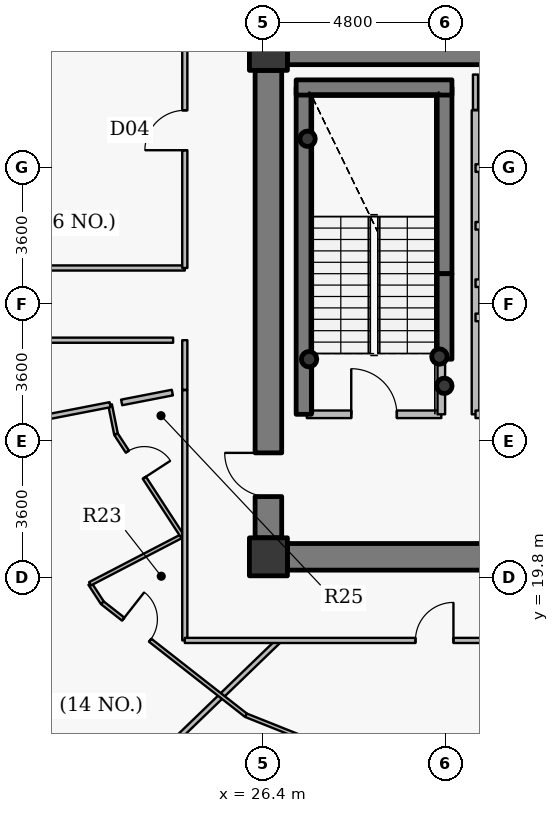
"""IFC4 building model, lengths in metres.
Left out: names, types, materials, properties, quantities, classifications, styles, units other than length and angle.
Written with IfcOpenShell. Run it as: python <this file> out.ifc"""

import sys

from ifc_helpers import new_model, si_unit, direction, frame, frame_2d, origin, origin_2d, place, context, subcontext, project, spatial, rectangle, hollow_circle, extrude, source, transform, mapped, element, fill, save


model = new_model("IFC4")
c1 = context("Model", 3, precision=1e-05, world=origin(), true_north=direction((0.0, 1.0)))
c2 = subcontext(c1, "Body", "Model", "MODEL_VIEW")
j1 = project(units=[si_unit("LENGTHUNIT", "METRE"), si_unit("PLANEANGLEUNIT", "RADIAN")], contexts=[c1])
p1 = place(None, origin())
s1 = spatial("IfcSite", under=j1, at=p1, CompositionType="ELEMENT")
p2 = place(p1, origin())
s2 = spatial("IfcBuilding", under=s1, at=p2, CompositionType="ELEMENT")
p3 = place(p2, frame((0.0, 0.0, 259.05)))
s3 = spatial("IfcBuildingStorey", under=s2, at=p3, CompositionType="ELEMENT", Elevation=259.05)
for number, where, z_axis, x_axis in (
    (1, (26.55, 20.35, 0.0), (0.0, 0.0, 1.0), (1.0, 0.0, 0.0)),
    (2, (26.55, 33.65, 0.0), (0.0, 0.0, 1.0), (1.0, 0.0, 0.0)),
):
    element("IfcColumn", number, at=place(p3, frame(where, z_axis=z_axis, x_axis=x_axis)), inside=s3, PredefinedType="COLUMN", context=c2, shape_type="SweptSolid", body=[
        extrude(rectangle(XDim=1.0, YDim=1.0, at=origin_2d()), origin(), (0.0, 0.0, 1.0), 3.75),
    ])
p4 = place(p3, frame((27.48, 24.1, 0.0), z_axis=(0.0, 0.0, 1.0), x_axis=(0.0, 1.0, 0.0)))
e3 = element("IfcWall", 3, at=p4, inside=s3, PredefinedType="SHEAR", context=c2, shape_type="SweptSolid", body=[
    extrude(rectangle(XDim=8.6, YDim=0.4, at=frame_2d((4.3, 0.0))), origin(), (0.0, 0.0, 1.0), 3.75),
])
p5 = place(p3, frame((31.18, 27.8, 0.0), z_axis=(0.0, 0.0, 1.0), x_axis=(0.0, 1.0, 0.0)))
e4 = element("IfcWall", 4, at=p5, inside=s3, PredefinedType="SHEAR", context=c2, shape_type="SweptSolid", body=[
    extrude(rectangle(XDim=4.9, YDim=0.4, at=frame_2d((2.45, 0.0))), origin(), (0.0, 0.0, 1.0), 3.75),
])
p6 = place(p3, frame((27.28, 32.7, 0.0), z_axis=(0.0, 0.0, 1.0), x_axis=(1.0, 0.0, 0.0)))
e5 = element("IfcWall", 5, at=p6, inside=s3, PredefinedType="SHEAR", context=c2, shape_type="SweptSolid", body=[
    extrude(rectangle(XDim=4.1, YDim=0.4, at=frame_2d((2.05, 0.0))), origin(), (0.0, 0.0, 1.0), 3.75),
])
for number, where, z_axis, x_axis in (
    (6, (27.58, 31.35, 0.0), (0.0, 0.0, 1.0), (1.0, 0.0, 0.0)),
    (7, (31.05, 25.62, 0.0), (0.0, 0.0, 1.0), (1.0, 0.0, 0.0)),
    (8, (31.18, 24.85, 0.0), (0.0, 0.0, 1.0), (1.0, 0.0, 0.0)),
    (9, (27.62, 25.55, 0.0), (0.0, 0.0, 1.0), (1.0, 0.0, 0.0)),
):
    element("IfcColumn", number, at=place(p3, frame(where, z_axis=z_axis, x_axis=x_axis)), inside=s3, PredefinedType="COLUMN", context=c2, shape_type="SweptSolid", body=[
        extrude(hollow_circle(Radius=0.203, WallThickness=0.016, at=origin_2d()), origin(), (0.0, 0.0, 1.0), 3.75),
    ])
p7 = place(p3, frame((27.05, 33.65, 0.0), z_axis=(0.0, 0.0, 1.0), x_axis=(1.0, 0.0, 0.0)))
e10 = element("IfcWall", 10, at=p7, inside=s3, PredefinedType="SHEAR", context=c2, shape_type="SweptSolid", body=[
    extrude(rectangle(XDim=17.9, YDim=0.7, at=frame_2d((8.95, 0.0))), origin(), (0.0, 0.0, 1.0), 3.0),
])
p8 = place(p7, frame((13.675, 0.0, 0.0)))
e11 = element("IfcOpeningElement", 11, at=p8, cuts=e10, PredefinedType="OPENING", context=c2, shape_type="SweptSolid", body=[
    extrude(rectangle(XDim=1.15, YDim=2.15, at=origin_2d()), frame((0.575, 0.36, 1.075), z_axis=(0.0, -1.0, 0.0), x_axis=(1.0, 0.0, 0.0)), (0.0, 0.0, 1.0), 0.72),
])
p9 = place(p3, frame((44.95, 20.35, 0.0), z_axis=(0.0, 0.0, 1.0), x_axis=(-1.0, 0.0, 0.0)))
e12 = element("IfcWall", 12, at=p9, inside=s3, PredefinedType="SHEAR", context=c2, shape_type="SweptSolid", body=[
    extrude(rectangle(XDim=17.9, YDim=0.7, at=frame_2d((8.95, 0.0))), origin(), (0.0, 0.0, 1.0), 3.0),
])
p10 = place(p9, frame((9.7, 0.0, 0.0)))
e13 = element("IfcOpeningElement", 13, at=p10, cuts=e12, PredefinedType="OPENING", context=c2, shape_type="SweptSolid", body=[
    extrude(rectangle(XDim=1.15, YDim=2.15, at=origin_2d()), frame((0.575, 0.36, 1.075), z_axis=(0.0, -1.0, 0.0), x_axis=(1.0, 0.0, 0.0)), (0.0, 0.0, 1.0), 0.72),
])
p11 = place(p3, frame((26.55, 20.85, 0.0), z_axis=(0.0, 0.0, 1.0), x_axis=(0.0, 1.0, 0.0)))
e14 = element("IfcWall", 14, at=p11, inside=s3, PredefinedType="SHEAR", context=c2, shape_type="SweptSolid", body=[
    extrude(rectangle(XDim=12.3, YDim=0.7, at=frame_2d((6.15, 0.0))), origin(), (0.0, 0.0, 1.0), 3.0),
])
p12 = place(p11, frame((1.085, 0.0, 0.0)))
e15 = element("IfcOpeningElement", 15, at=p12, cuts=e14, PredefinedType="OPENING", context=c2, shape_type="SweptSolid", body=[
    extrude(rectangle(XDim=1.15, YDim=2.15, at=origin_2d()), frame((0.575, 0.36, 1.075), z_axis=(0.0, -1.0, 0.0), x_axis=(1.0, 0.0, 0.0)), (0.0, 0.0, 1.0), 0.72),
])
p13 = place(p3, frame((31.18, 25.55, 0.0), z_axis=(0.0, 0.0, 1.0), x_axis=(0.0, 1.0, 0.0)))
e16 = element("IfcWall", 16, at=p13, inside=s3, PredefinedType="SHEAR", context=c2, shape_type="SweptSolid", body=[
    extrude(rectangle(XDim=2.25, YDim=0.4, at=frame_2d((1.125, 0.0))), origin(), (0.0, 0.0, 1.0), 3.05),
])
p14 = place(p3, frame((17.6, 27.95, 0.0), z_axis=(0.0, 0.0, 1.0), x_axis=(1.0, 0.0, 0.0)))
e17 = element("IfcWall", 17, at=p14, inside=s3, PredefinedType="PARTITIONING", context=c2, shape_type="SweptSolid", body=[
    extrude(rectangle(XDim=6.75, YDim=0.135, at=frame_2d((3.375, 0.0))), origin(), (0.0, 0.0, 1.0), 3.45),
])
p15 = place(p3, frame((20.756, 12.291, 0.0), z_axis=(0.0, 0.0, 1.0), x_axis=(0.719623273788, 0.694364705196, 0.0)))
e18 = element("IfcWall", 18, at=p15, inside=s3, PredefinedType="PARTITIONING", context=c2, shape_type="SweptSolid", body=[
    extrude(rectangle(XDim=8.438, YDim=0.135, at=frame_2d((4.219, 0.0))), origin(), (0.0, 0.0, 1.0), 2.935),
])
p16 = place(p3, frame((21.856, 19.641, 0.0), z_axis=(0.0, 0.0, 1.0), x_axis=(0.545246536912, -0.838275738636, 0.0)))
e19 = element("IfcWall", 19, at=p16, inside=s3, PredefinedType="PARTITIONING", context=c2, shape_type="SweptSolid", body=[
    extrude(rectangle(XDim=0.598, YDim=0.1, at=frame_2d((0.299, 0.0))), origin(), (0.0, 0.0, 1.0), 3.45),
])
p17 = place(p3, frame((21.856, 19.641, 0.0), z_axis=(0.0, 0.0, 1.0), x_axis=(0.887130502634, 0.461518657582, 0.0)))
e20 = element("IfcWall", 20, at=p17, inside=s3, PredefinedType="PARTITIONING", context=c2, shape_type="SweptSolid", body=[
    extrude(rectangle(XDim=2.733, YDim=0.1, at=frame_2d((1.367, 0.0))), origin(), (0.0, 0.0, 1.0), 3.45),
])
p18 = place(p3, frame((22.182, 19.139, 0.0), z_axis=(0.0, 0.0, 1.0), x_axis=(0.787386902975, -0.616459134917, 0.0)))
e21 = element("IfcWall", 21, at=p18, inside=s3, PredefinedType="PARTITIONING", context=c2, shape_type="SweptSolid", body=[
    extrude(rectangle(XDim=4.799, YDim=0.1, at=frame_2d((2.399, 0.0))), origin(), (0.0, 0.0, 1.0), 2.885),
])
p19 = place(p18, frame((0.695, 0.0, 0.0)))
e22 = element("IfcOpeningElement", 22, at=p19, cuts=e21, PredefinedType="OPENING", context=c2, shape_type="SweptSolid", body=[
    extrude(rectangle(XDim=0.9, YDim=2.1, at=origin_2d()), frame((0.45, 0.06, 1.05), z_axis=(0.0, -1.0, 0.0), x_axis=(1.0, 0.0, 0.0)), (0.0, 0.0, 1.0), 0.12),
])
p20 = place(p3, frame((22.383, 24.353, 0.0), z_axis=(0.0, 0.0, 1.0), x_axis=(0.198542560358, -0.980092266946, 0.0)))
e23 = element("IfcWall", 23, at=p20, inside=s3, PredefinedType="PARTITIONING", context=c2, shape_type="SweptSolid", body=[
    extrude(rectangle(XDim=0.793, YDim=0.1, at=frame_2d((0.396, 0.0))), origin(), (0.0, 0.0, 1.0), 2.885),
])
p21 = place(p3, frame((22.541, 23.576, 0.0), z_axis=(0.0, 0.0, 1.0), x_axis=(0.545375666154, -0.838191733893, 0.0)))
e24 = element("IfcWall", 24, at=p21, inside=s3, PredefinedType="PARTITIONING", context=c2, shape_type="SweptSolid", body=[
    extrude(rectangle(XDim=3.19, YDim=0.1, at=frame_2d((1.595, 0.0))), origin(), (0.0, 0.0, 1.0), 2.885),
])
p22 = place(p21, frame((0.546, 0.0, 0.0)))
e25 = element("IfcOpeningElement", 25, at=p22, cuts=e24, PredefinedType="OPENING", context=c2, shape_type="SweptSolid", body=[
    extrude(rectangle(XDim=0.82, YDim=2.1, at=origin_2d()), frame((0.41, 0.06, 1.05), z_axis=(0.0, -1.0, 0.0), x_axis=(1.0, 0.0, 0.0)), (0.0, 0.0, 1.0), 0.12),
])
p23 = place(p3, frame((24.35, 18.15, 0.0), z_axis=(0.0, 0.0, 1.0), x_axis=(0.0, 1.0, 0.0)))
e26 = element("IfcWall", 26, at=p23, inside=s3, PredefinedType="PARTITIONING", context=c2, shape_type="SweptSolid", body=[
    extrude(rectangle(XDim=6.585, YDim=0.135, at=frame_2d((3.293, 0.0))), origin(), (0.0, 0.0, 1.0), 2.885),
])
p24 = place(p3, frame((24.35, 18.15, 0.0), z_axis=(0.0, 0.0, 1.0), x_axis=(1.0, 0.0, 0.0)))
e27 = element("IfcWall", 27, at=p24, inside=s3, PredefinedType="PARTITIONING", context=c2, shape_type="SweptSolid", body=[
    extrude(rectangle(XDim=23.85, YDim=0.135, at=frame_2d((11.925, 0.0))), origin(), (0.0, 0.0, 1.0), 2.885),
])
p25 = place(p24, frame((6.069, 0.0, 0.0)))
e28 = element("IfcOpeningElement", 28, at=p25, cuts=e27, PredefinedType="OPENING", context=c2, shape_type="SweptSolid", body=[
    extrude(rectangle(XDim=1.0, YDim=2.15, at=origin_2d()), frame((0.5, 0.078, 1.075), z_axis=(0.0, -1.0, 0.0), x_axis=(1.0, 0.0, 0.0)), (0.0, 0.0, 1.0), 0.155),
])
p26 = place(p24, frame((19.505, 0.0, 0.0)))
e29 = element("IfcOpeningElement", 29, at=p26, cuts=e27, PredefinedType="OPENING", context=c2, shape_type="SweptSolid", body=[
    extrude(rectangle(XDim=1.0, YDim=2.15, at=origin_2d()), frame((0.5, 0.078, 1.075), z_axis=(0.0, -1.0, 0.0), x_axis=(1.0, 0.0, 0.0)), (0.0, 0.0, 1.0), 0.155),
])
p27 = place(p3, frame((24.35, 27.95, 0.0), z_axis=(0.0, 0.0, 1.0), x_axis=(0.0, 1.0, 0.0)))
e30 = element("IfcWall", 30, at=p27, inside=s3, PredefinedType="PARTITIONING", context=c2, shape_type="SweptSolid", body=[
    extrude(rectangle(XDim=7.9, YDim=0.135, at=frame_2d((3.95, 0.0))), origin(), (0.0, 0.0, 1.0), 2.885),
])
p28 = place(p27, frame((3.099, 0.0, 0.0)))
e31 = element("IfcOpeningElement", 31, at=p28, cuts=e30, PredefinedType="OPENING", context=c2, shape_type="SweptSolid", body=[
    extrude(rectangle(XDim=1.05, YDim=2.15, at=origin_2d()), frame((0.525, 0.078, 1.075), z_axis=(0.0, -1.0, 0.0), x_axis=(1.0, 0.0, 0.0)), (0.0, 0.0, 1.0), 0.155),
])
p29 = place(p3, frame((25.961, 16.181, 0.0), z_axis=(0.0, 0.0, 1.0), x_axis=(0.928801505367, -0.370577608105, 0.0)))
e32 = element("IfcWall", 32, at=p29, inside=s3, PredefinedType="PARTITIONING", context=c2, shape_type="SweptSolid", body=[
    extrude(rectangle(XDim=5.126, YDim=0.1, at=frame_2d((2.563, 0.0))), origin(), (0.0, 0.0, 1.0), 2.885),
])
p30 = place(p3, frame((27.56, 24.1, 0.0), z_axis=(0.0, 0.0, 1.0), x_axis=(1.0, 0.0, 0.0)))
e33 = element("IfcWall", 33, at=p30, inside=s3, PredefinedType="PARTITIONING", context=c2, shape_type="SweptSolid", body=[
    extrude(rectangle(XDim=3.54, YDim=0.2, at=frame_2d((1.77, 0.0))), origin(), (0.0, 0.0, 1.0), 3.45),
])
p31 = place(p30, frame((1.17, 0.0, 0.0)))
e34 = element("IfcOpeningElement", 34, at=p31, cuts=e33, PredefinedType="OPENING", context=c2, shape_type="SweptSolid", body=[
    extrude(rectangle(XDim=1.2, YDim=2.15, at=origin_2d()), frame((0.6, 0.11, 1.075), z_axis=(0.0, -1.0, 0.0), x_axis=(1.0, 0.0, 0.0)), (0.0, 0.0, 1.0), 0.22),
])
p32 = place(p3, frame((31.1, 24.1, 0.0), z_axis=(0.0, 0.0, 1.0), x_axis=(0.0, 1.0, 0.0)))
e35 = element("IfcWall", 35, at=p32, inside=s3, PredefinedType="PARTITIONING", context=c2, shape_type="SweptSolid", body=[
    extrude(rectangle(XDim=1.44, YDim=0.2, at=frame_2d((0.72, 0.0))), origin(), (0.0, 0.0, 1.0), 3.45),
])
p33 = place(p3, frame((32.0, 24.1, 0.0), z_axis=(0.0, 0.0, 1.0), x_axis=(0.0, 1.0, 0.0)))
e36 = element("IfcWall", 36, at=p33, inside=s3, PredefinedType="PARTITIONING", context=c2, shape_type="SweptSolid", body=[
    extrude(rectangle(XDim=8.0, YDim=0.2, at=frame_2d((4.0, 0.0))), origin(), (0.0, 0.0, 1.0), 3.45),
])
p34 = place(p3, frame((32.0, 24.1, 0.0), z_axis=(0.0, 0.0, 1.0), x_axis=(1.0, 0.0, 0.0)))
e37 = element("IfcWall", 37, at=p34, inside=s3, PredefinedType="PARTITIONING", context=c2, shape_type="SweptSolid", body=[
    extrude(rectangle(XDim=1.9, YDim=0.2, at=frame_2d((0.95, 0.0))), origin(), (0.0, 0.0, 1.0), 3.035),
])
p35 = place(p34, frame((0.375, 0.0, 0.0)))
e38 = element("IfcOpeningElement", 38, at=p35, cuts=e37, PredefinedType="OPENING", context=c2, shape_type="SweptSolid", body=[
    extrude(rectangle(XDim=1.15, YDim=2.15, at=origin_2d()), frame((0.575, 0.11, 1.075), z_axis=(0.0, -1.0, 0.0), x_axis=(1.0, 0.0, 0.0)), (0.0, 0.0, 1.0), 0.22),
])
for number, where, z_axis, x_axis in (
    (39, (32.0, 26.65, 0.0), (0.0, 0.0, 1.0), (1.0, 0.0, 0.0)),
    (40, (32.0, 27.55, 0.0), (0.0, 0.0, 1.0), (1.0, 0.0, 0.0)),
    (41, (32.0, 29.06, 0.0), (0.0, 0.0, 1.0), (1.0, 0.0, 0.0)),
    (42, (32.0, 30.58, 0.0), (0.0, 0.0, 1.0), (1.0, 0.0, 0.0)),
):
    element("IfcWall", number, at=place(p3, frame(where, z_axis=z_axis, x_axis=x_axis)), inside=s3, PredefinedType="PARTITIONING", context=c2, shape_type="SweptSolid", body=[
        extrude(rectangle(XDim=1.9, YDim=0.2, at=frame_2d((0.95, 0.0))), origin(), (0.0, 0.0, 1.0), 3.035),
    ])
p36 = place(p3, frame((32.0, 33.04, 0.0), z_axis=(0.0, 0.0, 1.0), x_axis=(0.0, -1.0, 0.0)))
e43 = element("IfcWall", 43, at=p36, inside=s3, PredefinedType="PARTITIONING", context=c2, shape_type="SweptSolid", body=[
    extrude(rectangle(XDim=0.93, YDim=0.135, at=frame_2d((0.465, 0.0))), origin(), (0.0, 0.0, 1.0), 2.985),
])
p37 = place(p3, frame((26.2, 33.692, 0.0), z_axis=(0.0, 0.0, 1.0), x_axis=(0.0, -1.0, 0.0)))
e44 = element("IfcWall", 44, at=p37, inside=s3, PredefinedType="PARTITIONING", context=c2, shape_type="SweptSolid", body=[
    extrude(rectangle(XDim=0.532, YDim=0.135, at=frame_2d((0.266, 0.0))), origin(), (0.0, 0.0, 1.0), 3.45),
])
p38 = place(p3, frame((26.2, 20.84, 0.0), z_axis=(0.0, 0.0, 1.0), x_axis=(0.0, -1.0, 0.0)))
e45 = element("IfcWall", 45, at=p38, inside=s3, PredefinedType="PARTITIONING", context=c2, shape_type="SweptSolid", body=[
    extrude(rectangle(XDim=0.84, YDim=0.135, at=frame_2d((0.42, 0.0))), origin(), (0.0, 0.0, 1.0), 3.45),
])
p39 = place(p3, frame((26.508, 20.0, 0.0), z_axis=(0.0, 0.0, 1.0), x_axis=(1.0, 0.0, 0.0)))
e46 = element("IfcWall", 46, at=p39, inside=s3, PredefinedType="PARTITIONING", context=c2, shape_type="SweptSolid", body=[
    extrude(rectangle(XDim=0.532, YDim=0.135, at=frame_2d((0.266, 0.0))), origin(), (0.0, 0.0, 1.0), 2.885),
])
p40 = place(p3, frame((24.35, 24.745, 0.0), z_axis=(0.0, 0.0, 1.0), x_axis=(0.0, 1.0, 0.0)))
e47 = element("IfcWall", 47, at=p40, inside=s3, PredefinedType="PARTITIONING", context=c2, shape_type="SweptSolid", body=[
    extrude(rectangle(XDim=1.305, YDim=0.135, at=frame_2d((0.652, 0.0))), origin(), (0.0, 0.0, 1.0), 3.45),
])
p41 = place(p3, frame((24.042, 26.05, 0.0), z_axis=(0.0, 0.0, 1.0), x_axis=(-1.0, 0.0, 0.0)))
e48 = element("IfcWall", 48, at=p41, inside=s3, PredefinedType="PARTITIONING", context=c2, shape_type="SweptSolid", body=[
    extrude(rectangle(XDim=4.285, YDim=0.135, at=frame_2d((2.143, 0.0))), origin(), (0.0, 0.0, 1.0), 3.45),
])
p42 = place(p3, frame((22.688, 24.412, 0.0), z_axis=(0.0, 0.0, 1.0), x_axis=(0.981616324133, 0.19086485322, 0.0)))
e49 = element("IfcWall", 49, at=p42, inside=s3, PredefinedType="PARTITIONING", context=c2, shape_type="SweptSolid", body=[
    extrude(rectangle(XDim=1.36, YDim=0.15, at=frame_2d((0.68, 0.0))), origin(), (0.0, 0.0, 1.0), 3.45),
])
p43 = place(p3, frame((19.758, 23.843, 0.0), z_axis=(0.0, 0.0, 1.0), x_axis=(0.98161966457, 0.190847672582, 0.0)))
e50 = element("IfcWall", 50, at=p43, inside=s3, PredefinedType="PARTITIONING", context=c2, shape_type="SweptSolid", body=[
    extrude(rectangle(XDim=2.675, YDim=0.135, at=frame_2d((1.337, 0.0))), origin(), (0.0, 0.0, 1.0), 3.45),
])
m1 = source(origin(), c2, "Body", "SweptSolid", [
    extrude(rectangle(XDim=1.15, YDim=2.15, at=origin_2d()), frame((0.575, 0.025, 1.075), z_axis=(0.0, -1.0, 0.0), x_axis=(1.0, 0.0, 0.0)), (0.0, 0.0, 1.0), 0.05),
])
p44 = place(p12, origin())
e51 = element("IfcDoor", 51, at=p44, inside=s3, OperationType="SINGLE_SWING_RIGHT", PredefinedType="DOOR", context=c2, shape_type="MappedRepresentation", body=[
    mapped(m1, transform((0.0, 0.0, 0.0), x_axis=(1.0, 0.0, 0.0), y_axis=(0.0, 1.0, 0.0), z_axis=(0.0, 0.0, 1.0), scale=1.0)),
])
fill(e15, e51)
m2 = source(origin(), c2, "Body", "SweptSolid", [
    extrude(rectangle(XDim=1.2, YDim=2.15, at=origin_2d()), frame((0.6, 0.025, 1.075), z_axis=(0.0, -1.0, 0.0), x_axis=(1.0, 0.0, 0.0)), (0.0, 0.0, 1.0), 0.05),
])
p45 = place(p31, origin())
e52 = element("IfcDoor", 52, at=p45, inside=s3, OperationType="SINGLE_SWING_LEFT", PredefinedType="DOOR", context=c2, shape_type="MappedRepresentation", body=[
    mapped(m2, transform((0.0, 0.0, 0.0), x_axis=(1.0, 0.0, 0.0), y_axis=(0.0, 1.0, 0.0), z_axis=(0.0, 0.0, 1.0), scale=1.0)),
])
fill(e34, e52)
m3 = source(origin(), c2, "Body", "SweptSolid", [
    extrude(rectangle(XDim=0.82, YDim=2.1, at=origin_2d()), frame((0.41, 0.025, 1.05), z_axis=(0.0, -1.0, 0.0), x_axis=(1.0, 0.0, 0.0)), (0.0, 0.0, 1.0), 0.05),
])
p46 = place(p22, origin())
e53 = element("IfcDoor", 53, at=p46, inside=s3, OperationType="SINGLE_SWING_RIGHT", PredefinedType="DOOR", context=c2, shape_type="MappedRepresentation", body=[
    mapped(m3, transform((0.0, 0.0, 0.0), x_axis=(1.0, 0.0, 0.0), y_axis=(0.0, 1.0, 0.0), z_axis=(0.0, 0.0, 1.0), scale=1.0)),
])
fill(e25, e53)
m4 = source(origin(), c2, "Body", "SweptSolid", [
    extrude(rectangle(XDim=0.9, YDim=2.1, at=origin_2d()), frame((0.45, 0.025, 1.05), z_axis=(0.0, -1.0, 0.0), x_axis=(1.0, 0.0, 0.0)), (0.0, 0.0, 1.0), 0.05),
])
p47 = place(p19, origin())
e54 = element("IfcDoor", 54, at=p47, inside=s3, OperationType="SINGLE_SWING_LEFT", PredefinedType="DOOR", context=c2, shape_type="MappedRepresentation", body=[
    mapped(m4, transform((0.0, 0.0, 0.0), x_axis=(1.0, 0.0, 0.0), y_axis=(0.0, 1.0, 0.0), z_axis=(0.0, 0.0, 1.0), scale=1.0)),
])
fill(e22, e54)
m5 = source(origin(), c2, "Body", "SweptSolid", [
    extrude(rectangle(XDim=1.0, YDim=2.15, at=origin_2d()), frame((0.5, 0.025, 1.075), z_axis=(0.0, -1.0, 0.0), x_axis=(1.0, 0.0, 0.0)), (0.0, 0.0, 1.0), 0.05),
])
p48 = place(p25, origin())
e55 = element("IfcDoor", 55, at=p48, inside=s3, OperationType="SINGLE_SWING_RIGHT", PredefinedType="DOOR", context=c2, shape_type="MappedRepresentation", body=[
    mapped(m5, transform((0.0, 0.0, 0.0), x_axis=(1.0, 0.0, 0.0), y_axis=(0.0, 1.0, 0.0), z_axis=(0.0, 0.0, 1.0), scale=1.0)),
])
fill(e28, e55)
m6 = source(origin(), c2, "Body", "SweptSolid", [
    extrude(rectangle(XDim=1.05, YDim=2.15, at=origin_2d()), frame((0.525, 0.025, 1.075), z_axis=(0.0, -1.0, 0.0), x_axis=(1.0, 0.0, 0.0)), (0.0, 0.0, 1.0), 0.05),
])
p49 = place(p28, origin())
e56 = element("IfcDoor", 56, at=p49, inside=s3, OperationType="SINGLE_SWING_LEFT", PredefinedType="DOOR", context=c2, shape_type="MappedRepresentation", body=[
    mapped(m6, transform((0.0, 0.0, 0.0), x_axis=(1.0, 0.0, 0.0), y_axis=(0.0, 1.0, 0.0), z_axis=(0.0, 0.0, 1.0), scale=1.0)),
])
fill(e31, e56)
save(model, sys.argv[1])
